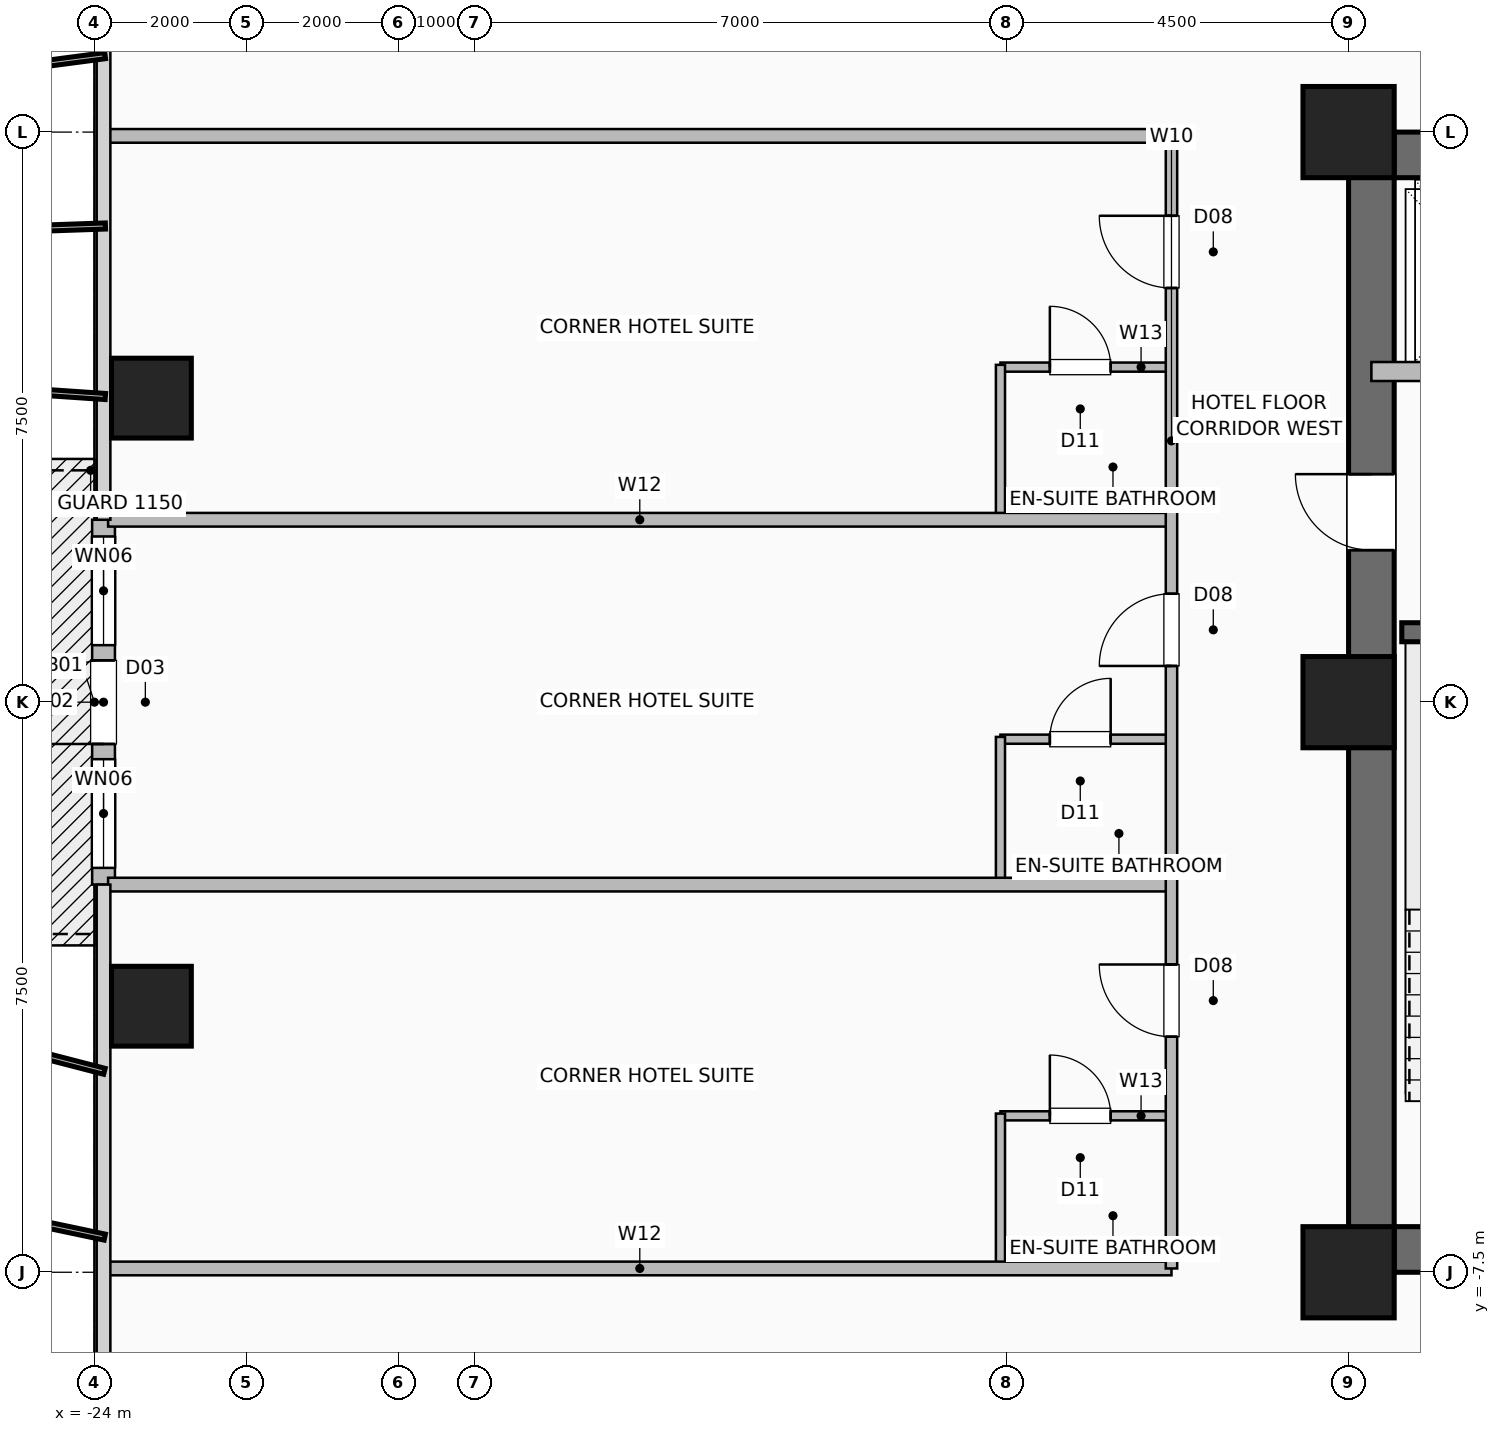
"""IFC4 building model, lengths in metres.
Left out: names, types, materials, properties, quantities, classifications, styles, units other than length and angle.
Written with IfcOpenShell. Run it as: python <this file> out.ifc"""

import sys

from ifc_helpers import new_model, si_unit, direction, frame, frame_2d, origin, origin_2d, place, context, subcontext, project, spatial, rectangle, hollow_rectangle, extrude, element, fill, save


model = new_model("IFC4")
c1 = context("Model", 3, precision=1e-05, world=origin(), true_north=direction((0.0, 1.0)))
c2 = subcontext(c1, "Body", "Model", "MODEL_VIEW")
j1 = project(units=[si_unit("LENGTHUNIT", "METRE"), si_unit("PLANEANGLEUNIT", "RADIAN")], contexts=[c1])
p1 = place(None, origin())
s1 = spatial("IfcSite", under=j1, at=p1, CompositionType="ELEMENT")
p2 = place(p1, origin())
s2 = spatial("IfcBuilding", under=s1, at=p2, CompositionType="ELEMENT")
p3 = place(p2, frame((0.0, 0.0, 48.0)))
s3 = spatial("IfcBuildingStorey", under=s2, at=p3, CompositionType="ELEMENT", Elevation=48.0)
for number, where, z_axis, x_axis in (
    (1, (-7.5, -7.5, 0.0), (0.0, 0.0, 1.0), (1.0, 0.0, 0.0)),
    (2, (-7.5, 7.5, 0.0), (0.0, 0.0, 1.0), (1.0, 0.0, 0.0)),
    (3, (-7.5, 0.0, 0.0), (0.0, 0.0, 1.0), (1.0, 0.0, 0.0)),
):
    element("IfcColumn", number, at=place(p3, frame(where, z_axis=z_axis, x_axis=x_axis)), inside=s3, PredefinedType="COLUMN", context=c2, shape_type="SweptSolid", body=[
        extrude(hollow_rectangle(XDim=1.2, YDim=1.2, WallThickness=0.055, at=origin_2d()), origin(), (0.0, 0.0, 1.0), 3.5),
    ])
for number, where, z_axis, x_axis in (
    (4, (-23.25, -4.0, 0.0), (0.0, 0.0, 1.0), (1.0, 0.0, 0.0)),
    (5, (-23.25, 4.0, 0.0), (0.0, 0.0, 1.0), (1.0, 0.0, 0.0)),
):
    element("IfcColumn", number, at=place(p3, frame(where, z_axis=z_axis, x_axis=x_axis)), inside=s3, PredefinedType="COLUMN", context=c2, shape_type="SweptSolid", body=[
        extrude(hollow_rectangle(XDim=1.05, YDim=1.05, WallThickness=0.05, at=origin_2d()), origin(), (0.0, 0.0, 1.0), 3.5),
    ])
p4 = place(p3, frame((-23.88, -2.4, 0.0), z_axis=(0.0, 0.0, 1.0), x_axis=(0.0, 1.0, 0.0)))
e6 = element("IfcWall", 6, at=p4, inside=s3, PredefinedType="SOLIDWALL", context=c2, shape_type="SweptSolid", body=[
    extrude(rectangle(XDim=4.8, YDim=0.3, at=frame_2d((2.4, 0.0))), origin(), (0.0, 0.0, 1.0), 3.25),
])
p5 = place(p4, frame((1.85, 0.0, 0.0)))
e7 = element("IfcOpeningElement", 7, at=p5, cuts=e6, PredefinedType="OPENING", context=c2, shape_type="SweptSolid", body=[
    extrude(rectangle(XDim=1.1, YDim=2.2, at=frame_2d((0.55, 1.1))), frame((0.0, 0.16, 0.0), z_axis=(0.0, -1.0, 0.0), x_axis=(1.0, 0.0, 0.0)), (0.0, 0.0, 1.0), 0.32),
])
p6 = place(p4, frame((0.22, 0.0, 0.85)))
e8 = element("IfcOpeningElement", 8, at=p6, cuts=e6, PredefinedType="OPENING", context=c2, shape_type="SweptSolid", body=[
    extrude(rectangle(XDim=1.43, YDim=1.8, at=frame_2d((0.715, 0.9))), frame((0.0, 0.16, 0.0), z_axis=(0.0, -1.0, 0.0), x_axis=(1.0, 0.0, 0.0)), (0.0, 0.0, 1.0), 0.32),
])
p7 = place(p4, frame((3.15, 0.0, 0.85)))
e9 = element("IfcOpeningElement", 9, at=p7, cuts=e6, PredefinedType="OPENING", context=c2, shape_type="SweptSolid", body=[
    extrude(rectangle(XDim=1.43, YDim=1.8, at=frame_2d((0.715, 0.9))), frame((0.0, 0.16, 0.0), z_axis=(0.0, -1.0, 0.0), x_axis=(1.0, 0.0, 0.0)), (0.0, 0.0, 1.0), 0.32),
])
p8 = place(p3, frame((-7.5, -7.2, 0.0), z_axis=(0.0, 0.0, 1.0), x_axis=(1.0, 0.0, 0.0)))
e10 = element("IfcWall", 10, at=p8, inside=s3, PredefinedType="SHEAR", context=c2, shape_type="SweptSolid", body=[
    extrude(rectangle(XDim=15.0, YDim=0.6, at=frame_2d((7.5, 0.0))), origin(), (0.0, 0.0, 1.0), 3.25),
])
p9 = place(p8, frame((1.55, 0.0, 0.0)))
e11 = element("IfcOpeningElement", 11, at=p9, cuts=e10, PredefinedType="OPENING", context=c2, shape_type="SweptSolid", body=[
    extrude(rectangle(XDim=1.05, YDim=2.08, at=frame_2d((0.525, 1.04))), frame((0.0, 0.31, 0.0), z_axis=(0.0, -1.0, 0.0), x_axis=(1.0, 0.0, 0.0)), (0.0, 0.0, 1.0), 0.62),
])
p10 = place(p8, frame((12.4, 0.0, 0.0)))
e12 = element("IfcOpeningElement", 12, at=p10, cuts=e10, PredefinedType="OPENING", context=c2, shape_type="SweptSolid", body=[
    extrude(rectangle(XDim=1.05, YDim=2.08, at=frame_2d((0.525, 1.04))), frame((0.0, 0.31, 0.0), z_axis=(0.0, -1.0, 0.0), x_axis=(1.0, 0.0, 0.0)), (0.0, 0.0, 1.0), 0.62),
])
p11 = place(p8, frame((4.64, 0.0, 0.0)))
e13 = element("IfcOpeningElement", 13, at=p11, cuts=e10, PredefinedType="OPENING", context=c2, shape_type="SweptSolid", body=[
    extrude(rectangle(XDim=1.1, YDim=2.2, at=frame_2d((0.55, 1.1))), frame((0.0, 0.31, 0.0), z_axis=(0.0, -1.0, 0.0), x_axis=(1.0, 0.0, 0.0)), (0.0, 0.0, 1.0), 0.62),
])
p12 = place(p8, frame((6.52, 0.0, 0.0)))
e14 = element("IfcOpeningElement", 14, at=p12, cuts=e10, PredefinedType="OPENING", context=c2, shape_type="SweptSolid", body=[
    extrude(rectangle(XDim=1.1, YDim=2.2, at=frame_2d((0.55, 1.1))), frame((0.0, 0.31, 0.0), z_axis=(0.0, -1.0, 0.0), x_axis=(1.0, 0.0, 0.0)), (0.0, 0.0, 1.0), 0.62),
])
p13 = place(p8, frame((8.4, 0.0, 0.0)))
e15 = element("IfcOpeningElement", 15, at=p13, cuts=e10, PredefinedType="OPENING", context=c2, shape_type="SweptSolid", body=[
    extrude(rectangle(XDim=1.1, YDim=2.2, at=frame_2d((0.55, 1.1))), frame((0.0, 0.31, 0.0), z_axis=(0.0, -1.0, 0.0), x_axis=(1.0, 0.0, 0.0)), (0.0, 0.0, 1.0), 0.62),
])
p14 = place(p3, frame((-7.5, 7.2, 0.0), z_axis=(0.0, 0.0, 1.0), x_axis=(1.0, 0.0, 0.0)))
e16 = element("IfcWall", 16, at=p14, inside=s3, PredefinedType="SHEAR", context=c2, shape_type="SweptSolid", body=[
    extrude(rectangle(XDim=15.0, YDim=0.6, at=frame_2d((7.5, 0.0))), origin(), (0.0, 0.0, 1.0), 3.25),
])
p15 = place(p3, frame((-7.2, -7.5, 0.0), z_axis=(0.0, 0.0, 1.0), x_axis=(0.0, 1.0, 0.0)))
e17 = element("IfcWall", 17, at=p15, inside=s3, PredefinedType="SHEAR", context=c2, shape_type="SweptSolid", body=[
    extrude(rectangle(XDim=15.0, YDim=0.6, at=frame_2d((7.5, 0.0))), origin(), (0.0, 0.0, 1.0), 3.25),
])
p16 = place(p15, frame((9.5, 0.0, 0.0)))
e18 = element("IfcOpeningElement", 18, at=p16, cuts=e17, PredefinedType="OPENING", context=c2, shape_type="SweptSolid", body=[
    extrude(rectangle(XDim=1.0, YDim=2.08, at=frame_2d((0.5, 1.04))), frame((0.0, 0.31, 0.0), z_axis=(0.0, -1.0, 0.0), x_axis=(1.0, 0.0, 0.0)), (0.0, 0.0, 1.0), 0.62),
])
p17 = place(p3, frame((-6.8, 0.92, 0.0), z_axis=(0.0, 0.0, 1.0), x_axis=(1.0, 0.0, 0.0)))
e19 = element("IfcWall", 19, at=p17, inside=s3, PredefinedType="SHEAR", context=c2, shape_type="SweptSolid", body=[
    extrude(rectangle(XDim=3.33, YDim=0.25, at=frame_2d((1.665, 0.0))), origin(), (0.0, 0.0, 1.0), 3.25),
])
p18 = place(p3, frame((-7.2, 4.35, 0.0), z_axis=(0.0, 0.0, 1.0), x_axis=(1.0, 0.0, 0.0)))
e20 = element("IfcWall", 20, at=p18, inside=s3, PredefinedType="SHEAR", context=c2, shape_type="SweptSolid", body=[
    extrude(rectangle(XDim=2.7, YDim=0.25, at=frame_2d((1.35, 0.0))), origin(), (0.0, 0.0, 1.0), 3.25),
])
p19 = place(p18, frame((0.75, 0.0, 0.0)))
e21 = element("IfcOpeningElement", 21, at=p19, cuts=e20, PredefinedType="OPENING", context=c2, shape_type="SweptSolid", body=[
    extrude(rectangle(XDim=1.2, YDim=2.2, at=frame_2d((0.6, 1.1))), frame((0.0, 0.135, 0.0), z_axis=(0.0, -1.0, 0.0), x_axis=(1.0, 0.0, 0.0)), (0.0, 0.0, 1.0), 0.27),
])
p20 = place(p3, frame((-12.08, -5.442, 0.0), z_axis=(0.0, 0.0, 1.0), x_axis=(1.0, 0.0, 0.0)))
e22 = element("IfcWall", 22, at=p20, inside=s3, PredefinedType="PLUMBINGWALL", context=c2, shape_type="SweptSolid", body=[
    extrude(rectangle(XDim=2.25, YDim=0.12, at=frame_2d((1.125, 0.0))), origin(), (0.0, 0.0, 1.0), 3.25),
])
p21 = place(p20, frame((0.65, 0.0, 0.0)))
e23 = element("IfcOpeningElement", 23, at=p21, cuts=e22, PredefinedType="OPENING", context=c2, shape_type="SweptSolid", body=[
    extrude(rectangle(XDim=0.8, YDim=2.05, at=frame_2d((0.4, 1.025))), frame((0.0, 0.07, 0.0), z_axis=(0.0, -1.0, 0.0), x_axis=(1.0, 0.0, 0.0)), (0.0, 0.0, 1.0), 0.14),
])
p22 = place(p3, frame((-12.08, -7.42, 0.0), z_axis=(0.0, 0.0, 1.0), x_axis=(0.0, 1.0, 0.0)))
e24 = element("IfcWall", 24, at=p22, inside=s3, PredefinedType="PLUMBINGWALL", context=c2, shape_type="SweptSolid", body=[
    extrude(rectangle(XDim=2.008, YDim=0.12, at=frame_2d((1.004, 0.0))), origin(), (0.0, 0.0, 1.0), 3.25),
])
p23 = place(p3, frame((-12.08, -0.487, 0.0), z_axis=(0.0, 0.0, 1.0), x_axis=(1.0, 0.0, 0.0)))
e25 = element("IfcWall", 25, at=p23, inside=s3, PredefinedType="PLUMBINGWALL", context=c2, shape_type="SweptSolid", body=[
    extrude(rectangle(XDim=2.25, YDim=0.12, at=frame_2d((1.125, 0.0))), origin(), (0.0, 0.0, 1.0), 3.25),
])
p24 = place(p23, frame((0.65, 0.0, 0.0)))
e26 = element("IfcOpeningElement", 26, at=p24, cuts=e25, PredefinedType="OPENING", context=c2, shape_type="SweptSolid", body=[
    extrude(rectangle(XDim=0.8, YDim=2.05, at=frame_2d((0.4, 1.025))), frame((0.0, 0.07, 0.0), z_axis=(0.0, -1.0, 0.0), x_axis=(1.0, 0.0, 0.0)), (0.0, 0.0, 1.0), 0.14),
])
p25 = place(p3, frame((-12.08, -2.37, 0.0), z_axis=(0.0, 0.0, 1.0), x_axis=(0.0, 1.0, 0.0)))
e27 = element("IfcWall", 27, at=p25, inside=s3, PredefinedType="PLUMBINGWALL", context=c2, shape_type="SweptSolid", body=[
    extrude(rectangle(XDim=1.913, YDim=0.12, at=frame_2d((0.957, 0.0))), origin(), (0.0, 0.0, 1.0), 3.25),
])
p26 = place(p3, frame((-12.08, 4.408, 0.0), z_axis=(0.0, 0.0, 1.0), x_axis=(1.0, 0.0, 0.0)))
e28 = element("IfcWall", 28, at=p26, inside=s3, PredefinedType="PLUMBINGWALL", context=c2, shape_type="SweptSolid", body=[
    extrude(rectangle(XDim=2.25, YDim=0.12, at=frame_2d((1.125, 0.0))), origin(), (0.0, 0.0, 1.0), 3.25),
])
p27 = place(p26, frame((0.65, 0.0, 0.0)))
e29 = element("IfcOpeningElement", 29, at=p27, cuts=e28, PredefinedType="OPENING", context=c2, shape_type="SweptSolid", body=[
    extrude(rectangle(XDim=0.8, YDim=2.05, at=frame_2d((0.4, 1.025))), frame((0.0, 0.07, 0.0), z_axis=(0.0, -1.0, 0.0), x_axis=(1.0, 0.0, 0.0)), (0.0, 0.0, 1.0), 0.14),
])
p28 = place(p3, frame((-12.08, 2.43, 0.0), z_axis=(0.0, 0.0, 1.0), x_axis=(0.0, 1.0, 0.0)))
e30 = element("IfcWall", 30, at=p28, inside=s3, PredefinedType="PLUMBINGWALL", context=c2, shape_type="SweptSolid", body=[
    extrude(rectangle(XDim=2.008, YDim=0.12, at=frame_2d((1.004, 0.0))), origin(), (0.0, 0.0, 1.0), 3.25),
])
for number, where, z_axis, x_axis in (
    (31, (-23.82, -7.45, 0.0), (0.0, 0.0, 1.0), (1.0, 0.0, 0.0)),
    (32, (-23.82, -2.4, 0.0), (0.0, 0.0, 1.0), (1.0, 0.0, 0.0)),
    (33, (-23.82, 2.4, 0.0), (0.0, 0.0, 1.0), (1.0, 0.0, 0.0)),
    (34, (-23.82, 7.45, 0.0), (0.0, 0.0, 1.0), (1.0, 0.0, 0.0)),
):
    element("IfcWall", number, at=place(p3, frame(where, z_axis=z_axis, x_axis=x_axis)), inside=s3, PredefinedType="PARTITIONING", context=c2, shape_type="SweptSolid", body=[
        extrude(rectangle(XDim=13.99, YDim=0.18, at=frame_2d((6.995, 0.0))), origin(), (0.0, 0.0, 1.0), 3.25),
    ])
p29 = place(p3, frame((-9.83, -7.45, 0.0), z_axis=(0.0, 0.0, 1.0), x_axis=(0.0, 1.0, 0.0)))
e35 = element("IfcWall", 35, at=p29, inside=s3, PredefinedType="PARTITIONING", context=c2, shape_type="SweptSolid", body=[
    extrude(rectangle(XDim=14.9, YDim=0.15, at=frame_2d((7.45, 0.0))), origin(), (0.0, 0.0, 1.0), 3.25),
])
p30 = place(p29, frame((3.049, 0.0, 0.0)))
e36 = element("IfcOpeningElement", 36, at=p30, cuts=e35, PredefinedType="OPENING", context=c2, shape_type="SweptSolid", body=[
    extrude(rectangle(XDim=0.95, YDim=2.08, at=frame_2d((0.475, 1.04))), frame((0.0, 0.085, 0.0), z_axis=(0.0, -1.0, 0.0), x_axis=(1.0, 0.0, 0.0)), (0.0, 0.0, 1.0), 0.17),
])
p31 = place(p29, frame((7.927, 0.0, 0.0)))
e37 = element("IfcOpeningElement", 37, at=p31, cuts=e35, PredefinedType="OPENING", context=c2, shape_type="SweptSolid", body=[
    extrude(rectangle(XDim=0.95, YDim=2.08, at=frame_2d((0.475, 1.04))), frame((0.0, 0.085, 0.0), z_axis=(0.0, -1.0, 0.0), x_axis=(1.0, 0.0, 0.0)), (0.0, 0.0, 1.0), 0.17),
])
p32 = place(p29, frame((12.899, 0.0, 0.0)))
e38 = element("IfcOpeningElement", 38, at=p32, cuts=e35, PredefinedType="OPENING", context=c2, shape_type="SweptSolid", body=[
    extrude(rectangle(XDim=0.95, YDim=2.08, at=frame_2d((0.475, 1.04))), frame((0.0, 0.085, 0.0), z_axis=(0.0, -1.0, 0.0), x_axis=(1.0, 0.0, 0.0)), (0.0, 0.0, 1.0), 0.17),
])
p33 = place(p5, origin())
e39 = element("IfcDoor", 39, at=p33, inside=s3, OperationType="SINGLE_SWING_LEFT", PredefinedType="DOOR", context=c2, shape_type="SweptSolid", body=[
    extrude(rectangle(XDim=1.1, YDim=2.2, at=frame_2d((0.55, 1.1))), frame((0.0, 0.025, 0.0), z_axis=(0.0, -1.0, 0.0), x_axis=(1.0, 0.0, 0.0)), (0.0, 0.0, 1.0), 0.05),
])
fill(e7, e39)
p34 = place(p6, origin())
e40 = element("IfcWindow", 40, at=p34, inside=s3, PartitioningType="SINGLE_PANEL", PredefinedType="WINDOW", context=c2, shape_type="SweptSolid", body=[
    extrude(rectangle(XDim=1.43, YDim=1.8, at=frame_2d((0.715, 0.9))), frame((0.0, 0.03, 0.0), z_axis=(0.0, -1.0, 0.0), x_axis=(1.0, 0.0, 0.0)), (0.0, 0.0, 1.0), 0.06),
])
fill(e8, e40)
p35 = place(p7, origin())
e41 = element("IfcWindow", 41, at=p35, inside=s3, PartitioningType="SINGLE_PANEL", PredefinedType="WINDOW", context=c2, shape_type="SweptSolid", body=[
    extrude(rectangle(XDim=1.43, YDim=1.8, at=frame_2d((0.715, 0.9))), frame((0.0, 0.03, 0.0), z_axis=(0.0, -1.0, 0.0), x_axis=(1.0, 0.0, 0.0)), (0.0, 0.0, 1.0), 0.06),
])
fill(e9, e41)
p36 = place(p16, origin())
e42 = element("IfcDoor", 42, at=p36, inside=s3, OperationType="SINGLE_SWING_RIGHT", PredefinedType="DOOR", context=c2, shape_type="SweptSolid", body=[
    extrude(rectangle(XDim=1.0, YDim=2.08, at=frame_2d((0.5, 1.04))), frame((0.0, 0.025, 0.0), z_axis=(0.0, -1.0, 0.0), x_axis=(1.0, 0.0, 0.0)), (0.0, 0.0, 1.0), 0.05),
])
fill(e18, e42)
p37 = place(p21, origin())
e43 = element("IfcDoor", 43, at=p37, inside=s3, OperationType="SINGLE_SWING_LEFT", PredefinedType="DOOR", context=c2, shape_type="SweptSolid", body=[
    extrude(rectangle(XDim=0.8, YDim=2.05, at=frame_2d((0.4, 1.025))), frame((0.0, 0.025, 0.0), z_axis=(0.0, -1.0, 0.0), x_axis=(1.0, 0.0, 0.0)), (0.0, 0.0, 1.0), 0.05),
])
fill(e23, e43)
p38 = place(p24, origin())
e44 = element("IfcDoor", 44, at=p38, inside=s3, OperationType="SINGLE_SWING_RIGHT", PredefinedType="DOOR", context=c2, shape_type="SweptSolid", body=[
    extrude(rectangle(XDim=0.8, YDim=2.05, at=frame_2d((0.4, 1.025))), frame((0.0, 0.025, 0.0), z_axis=(0.0, -1.0, 0.0), x_axis=(1.0, 0.0, 0.0)), (0.0, 0.0, 1.0), 0.05),
])
fill(e26, e44)
p39 = place(p27, origin())
e45 = element("IfcDoor", 45, at=p39, inside=s3, OperationType="SINGLE_SWING_LEFT", PredefinedType="DOOR", context=c2, shape_type="SweptSolid", body=[
    extrude(rectangle(XDim=0.8, YDim=2.05, at=frame_2d((0.4, 1.025))), frame((0.0, 0.025, 0.0), z_axis=(0.0, -1.0, 0.0), x_axis=(1.0, 0.0, 0.0)), (0.0, 0.0, 1.0), 0.05),
])
fill(e29, e45)
p40 = place(p30, origin())
e46 = element("IfcDoor", 46, at=p40, inside=s3, OperationType="SINGLE_SWING_RIGHT", PredefinedType="DOOR", context=c2, shape_type="SweptSolid", body=[
    extrude(rectangle(XDim=0.95, YDim=2.08, at=frame_2d((0.475, 1.04))), frame((0.0, 0.025, 0.0), z_axis=(0.0, -1.0, 0.0), x_axis=(1.0, 0.0, 0.0)), (0.0, 0.0, 1.0), 0.05),
])
fill(e36, e46)
p41 = place(p31, origin())
e47 = element("IfcDoor", 47, at=p41, inside=s3, OperationType="SINGLE_SWING_LEFT", PredefinedType="DOOR", context=c2, shape_type="SweptSolid", body=[
    extrude(rectangle(XDim=0.95, YDim=2.08, at=frame_2d((0.475, 1.04))), frame((0.0, 0.025, 0.0), z_axis=(0.0, -1.0, 0.0), x_axis=(1.0, 0.0, 0.0)), (0.0, 0.0, 1.0), 0.05),
])
fill(e37, e47)
p42 = place(p32, origin())
e48 = element("IfcDoor", 48, at=p42, inside=s3, OperationType="SINGLE_SWING_RIGHT", PredefinedType="DOOR", context=c2, shape_type="SweptSolid", body=[
    extrude(rectangle(XDim=0.95, YDim=2.08, at=frame_2d((0.475, 1.04))), frame((0.0, 0.025, 0.0), z_axis=(0.0, -1.0, 0.0), x_axis=(1.0, 0.0, 0.0)), (0.0, 0.0, 1.0), 0.05),
])
fill(e38, e48)
save(model, sys.argv[1])
